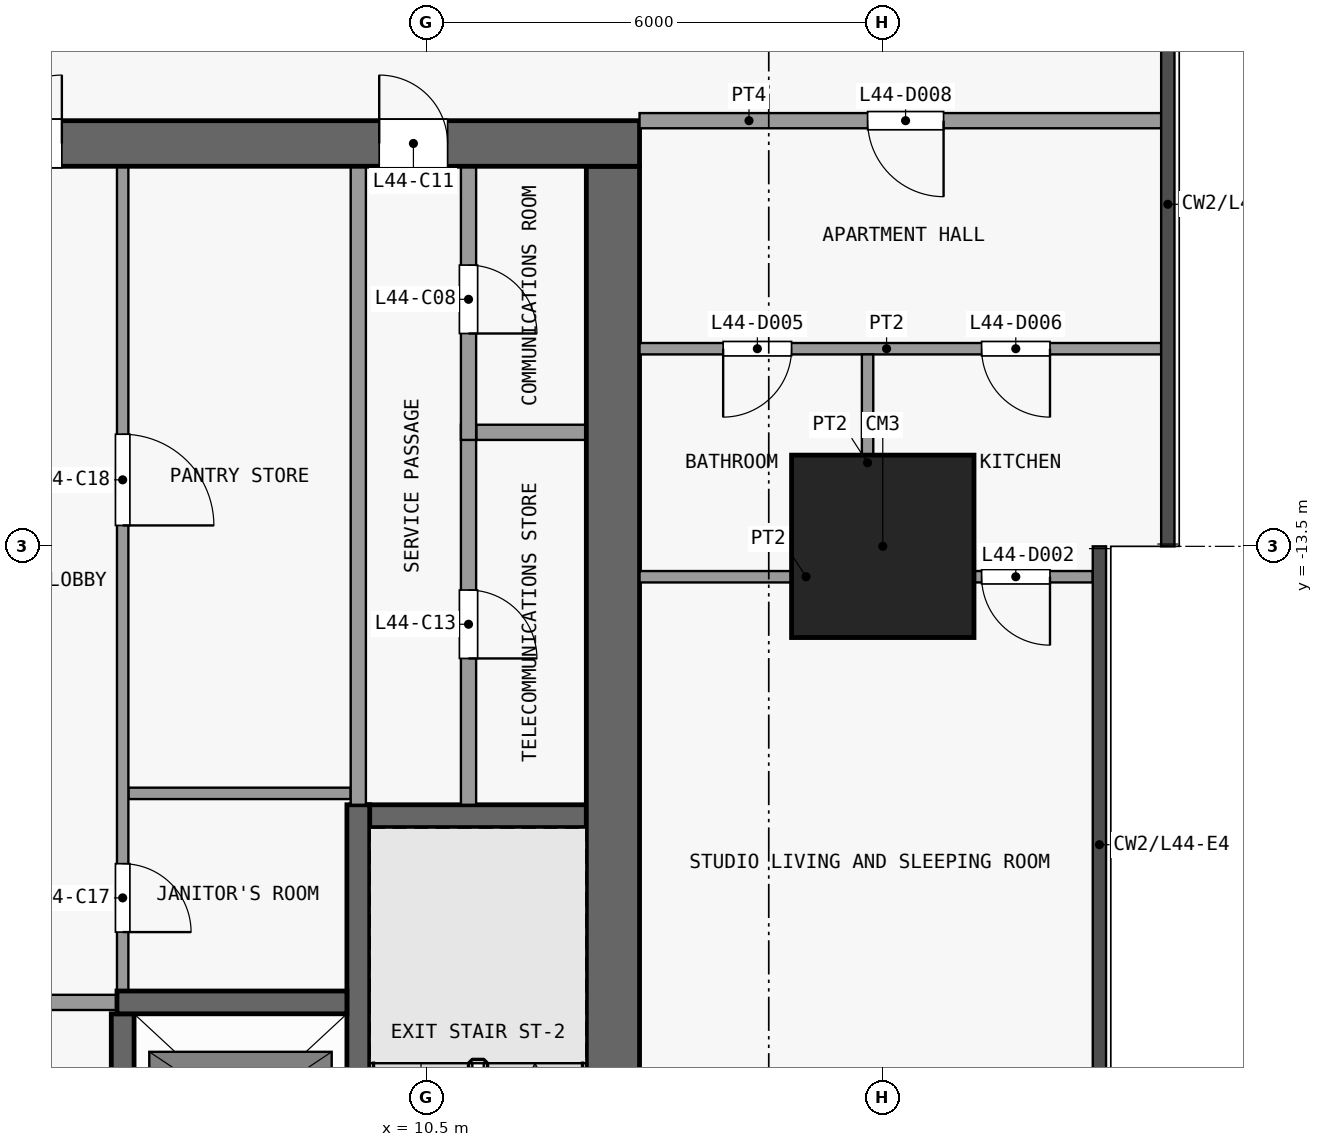
"""IFC4 building model, lengths in metres.
Left out: names, types, materials, properties, quantities, classifications, styles, units other than length and angle.
Written with IfcOpenShell. Run it as: python <this file> out.ifc"""

import sys

from ifc_helpers import new_model, si_unit, direction, frame, frame_2d, origin, origin_2d, place, context, subcontext, project, spatial, rectangle, extrude, element, fill, save


model = new_model("IFC4")
c1 = context("Model", 3, precision=1e-05, world=origin(), true_north=direction((0.0, 1.0)))
c2 = subcontext(c1, "Body", "Model", "MODEL_VIEW")
j1 = project(units=[si_unit("LENGTHUNIT", "METRE"), si_unit("PLANEANGLEUNIT", "RADIAN")], contexts=[c1])
p1 = place(None, origin())
s1 = spatial("IfcSite", under=j1, at=p1, CompositionType="ELEMENT")
p2 = place(p1, origin())
s2 = spatial("IfcBuilding", under=s1, at=p2, CompositionType="ELEMENT")
p3 = place(p2, frame((0.0, 0.0, 178.1)))
s3 = spatial("IfcBuildingStorey", under=s2, at=p3, CompositionType="ELEMENT", Elevation=178.1)
p4 = place(p3, frame((16.5, -13.5, 0.0), z_axis=(0.0, 0.0, 1.0), x_axis=(1.0, 0.0, 0.0)))
e1 = element("IfcColumn", 1, at=p4, inside=s3, PredefinedType="COLUMN", context=c2, shape_type="SweptSolid", body=[
    extrude(rectangle(XDim=2.4, YDim=2.4, at=origin_2d()), origin(), (0.0, 0.0, 1.0), 3.6),
])
p5 = place(p3, frame((-13.3, -8.2, 0.0), z_axis=(0.0, 0.0, 1.0), x_axis=(1.0, 0.0, 0.0)))
e2 = element("IfcWall", 2, at=p5, inside=s3, PredefinedType="SHEAR", context=c2, shape_type="SweptSolid", body=[
    extrude(rectangle(XDim=26.6, YDim=0.6, at=frame_2d((13.3, 0.0))), origin(), (0.0, 0.0, 1.0), 3.3),
])
p6 = place(p5, frame((7.6, 0.0, 0.0)))
e3 = element("IfcOpeningElement", 3, at=p6, cuts=e2, PredefinedType="OPENING", context=c2, shape_type="SweptSolid", body=[
    extrude(rectangle(XDim=1.8, YDim=2.1, at=frame_2d((0.9, 1.05))), frame((0.0, 0.31, 0.0), z_axis=(0.0, -1.0, 0.0), x_axis=(1.0, 0.0, 0.0)), (0.0, 0.0, 1.0), 0.62),
])
p7 = place(p5, frame((17.2, 0.0, 0.0)))
e4 = element("IfcOpeningElement", 4, at=p7, cuts=e2, PredefinedType="OPENING", context=c2, shape_type="SweptSolid", body=[
    extrude(rectangle(XDim=1.8, YDim=2.1, at=frame_2d((0.9, 1.05))), frame((0.0, 0.31, 0.0), z_axis=(0.0, -1.0, 0.0), x_axis=(1.0, 0.0, 0.0)), (0.0, 0.0, 1.0), 0.62),
])
p8 = place(p5, frame((2.525, 0.0, 0.0)))
e5 = element("IfcOpeningElement", 5, at=p8, cuts=e2, PredefinedType="OPENING", context=c2, shape_type="SweptSolid", body=[
    extrude(rectangle(XDim=0.9, YDim=2.1, at=frame_2d((0.45, 1.05))), frame((0.0, 0.31, 0.0), z_axis=(0.0, -1.0, 0.0), x_axis=(1.0, 0.0, 0.0)), (0.0, 0.0, 1.0), 0.62),
])
p9 = place(p5, frame((23.175, 0.0, 0.0)))
e6 = element("IfcOpeningElement", 6, at=p9, cuts=e2, PredefinedType="OPENING", context=c2, shape_type="SweptSolid", body=[
    extrude(rectangle(XDim=0.9, YDim=2.1, at=frame_2d((0.45, 1.05))), frame((0.0, 0.31, 0.0), z_axis=(0.0, -1.0, 0.0), x_axis=(1.0, 0.0, 0.0)), (0.0, 0.0, 1.0), 0.62),
])
p10 = place(p3, frame((12.95, -24.6, 0.0), z_axis=(0.0, 0.0, 1.0), x_axis=(0.0, 1.0, 0.0)))
e7 = element("IfcWall", 7, at=p10, inside=s3, PredefinedType="SHEAR", context=c2, shape_type="SweptSolid", body=[
    extrude(rectangle(XDim=16.1, YDim=0.7, at=frame_2d((8.05, 0.0))), origin(), (0.0, 0.0, 1.0), 3.3),
])
p11 = place(p3, frame((6.575, -19.5, 0.0), z_axis=(0.0, 0.0, 1.0), x_axis=(-1.0, 0.0, 0.0)))
e8 = element("IfcWall", 8, at=p11, inside=s3, PredefinedType="PARTITIONING", context=c2, shape_type="SweptSolid", body=[
    extrude(rectangle(XDim=3.325, YDim=0.2, at=frame_2d((1.663, 0.0))), origin(), (0.0, 0.0, 1.0), 3.3),
])
p12 = place(p11, frame((1.025, 0.0, 0.0)))
e9 = element("IfcOpeningElement", 9, at=p12, cuts=e8, PredefinedType="OPENING", context=c2, shape_type="SweptSolid", body=[
    extrude(rectangle(XDim=1.5, YDim=2.1, at=frame_2d((0.75, 1.05))), frame((0.0, 0.11, 0.0), z_axis=(0.0, -1.0, 0.0), x_axis=(1.0, 0.0, 0.0)), (0.0, 0.0, 1.0), 0.22),
])
p13 = place(p3, frame((6.425, -19.5, 0.0), z_axis=(0.0, 0.0, 1.0), x_axis=(1.0, 0.0, 0.0)))
e10 = element("IfcWall", 10, at=p13, inside=s3, PredefinedType="SHEAR", context=c2, shape_type="SweptSolid", body=[
    extrude(rectangle(XDim=3.025, YDim=0.3, at=frame_2d((1.512, 0.0))), origin(), (0.0, 0.0, 1.0), 3.3),
])
p14 = place(p3, frame((9.5, -17.05, 0.0), z_axis=(0.0, 0.0, 1.0), x_axis=(1.0, 0.0, 0.0)))
e11 = element("IfcWall", 11, at=p14, inside=s3, PredefinedType="SHEAR", context=c2, shape_type="SweptSolid", body=[
    extrude(rectangle(XDim=3.1, YDim=0.3, at=frame_2d((1.55, 0.0))), origin(), (0.0, 0.0, 1.0), 3.3),
])
p15 = place(p3, frame((6.575, -16.75, 0.0), z_axis=(0.0, 0.0, 1.0), x_axis=(1.0, 0.0, 0.0)))
e12 = element("IfcWall", 12, at=p15, inside=s3, PredefinedType="PARTITIONING", context=c2, shape_type="SweptSolid", body=[
    extrude(rectangle(XDim=2.925, YDim=0.15, at=frame_2d((1.462, 0.0))), origin(), (0.0, 0.0, 1.0), 3.3),
])
p16 = place(p3, frame((11.15, -12.0, 0.0), z_axis=(0.0, 0.0, 1.0), x_axis=(1.0, 0.0, 0.0)))
e13 = element("IfcWall", 13, at=p16, inside=s3, PredefinedType="PARTITIONING", context=c2, shape_type="SweptSolid", body=[
    extrude(rectangle(XDim=1.45, YDim=0.2, at=frame_2d((0.725, 0.0))), origin(), (0.0, 0.0, 1.0), 3.3),
])
p17 = place(p3, frame((6.5, -22.25, 0.0), z_axis=(0.0, 0.0, 1.0), x_axis=(0.0, 1.0, 0.0)))
e14 = element("IfcWall", 14, at=p17, inside=s3, PredefinedType="SHEAR", context=c2, shape_type="SweptSolid", body=[
    extrude(rectangle(XDim=2.6, YDim=0.3, at=frame_2d((1.3, 0.0))), origin(), (0.0, 0.0, 1.0), 3.3),
])
p18 = place(p17, frame((0.75, 0.0, 0.0)))
e15 = element("IfcOpeningElement", 15, at=p18, cuts=e14, PredefinedType="OPENING", context=c2, shape_type="SweptSolid", body=[
    extrude(rectangle(XDim=1.1, YDim=2.1, at=frame_2d((0.55, 1.05))), frame((0.0, 0.16, 0.0), z_axis=(0.0, -1.0, 0.0), x_axis=(1.0, 0.0, 0.0)), (0.0, 0.0, 1.0), 0.32),
])
p19 = place(p3, frame((6.5, -8.5, 0.0), z_axis=(0.0, 0.0, 1.0), x_axis=(0.0, -1.0, 0.0)))
e16 = element("IfcWall", 16, at=p19, inside=s3, PredefinedType="PARTITIONING", context=c2, shape_type="SweptSolid", body=[
    extrude(rectangle(XDim=10.85, YDim=0.15, at=frame_2d((5.425, 0.0))), origin(), (0.0, 0.0, 1.0), 3.3),
])
p20 = place(p19, frame((9.175, 0.0, 0.0)))
e17 = element("IfcOpeningElement", 17, at=p20, cuts=e16, PredefinedType="OPENING", context=c2, shape_type="SweptSolid", body=[
    extrude(rectangle(XDim=0.9, YDim=2.1, at=frame_2d((0.45, 1.05))), frame((0.0, 0.085, 0.0), z_axis=(0.0, -1.0, 0.0), x_axis=(1.0, 0.0, 0.0)), (0.0, 0.0, 1.0), 0.17),
])
p21 = place(p19, frame((3.525, 0.0, 0.0)))
e18 = element("IfcOpeningElement", 18, at=p21, cuts=e16, PredefinedType="OPENING", context=c2, shape_type="SweptSolid", body=[
    extrude(rectangle(XDim=1.2, YDim=2.1, at=frame_2d((0.6, 1.05))), frame((0.0, 0.085, 0.0), z_axis=(0.0, -1.0, 0.0), x_axis=(1.0, 0.0, 0.0)), (0.0, 0.0, 1.0), 0.17),
])
p22 = place(p3, frame((9.6, -16.9, 0.0), z_axis=(0.0, 0.0, 1.0), x_axis=(0.0, -1.0, 0.0)))
e19 = element("IfcWall", 19, at=p22, inside=s3, PredefinedType="SHEAR", context=c2, shape_type="SweptSolid", body=[
    extrude(rectangle(XDim=7.7, YDim=0.3, at=frame_2d((3.85, 0.0))), origin(), (0.0, 0.0, 1.0), 3.3),
])
p23 = place(p22, frame((6.5, 0.0, 0.0)))
e20 = element("IfcOpeningElement", 20, at=p23, cuts=e19, PredefinedType="OPENING", context=c2, shape_type="SweptSolid", body=[
    extrude(rectangle(XDim=1.1, YDim=2.1, at=frame_2d((0.55, 1.05))), frame((0.0, 0.16, 0.0), z_axis=(0.0, -1.0, 0.0), x_axis=(1.0, 0.0, 0.0)), (0.0, 0.0, 1.0), 0.32),
])
p24 = place(p3, frame((9.6, -16.9, 0.0), z_axis=(0.0, 0.0, 1.0), x_axis=(0.0, 1.0, 0.0)))
e21 = element("IfcWall", 21, at=p24, inside=s3, PredefinedType="PARTITIONING", context=c2, shape_type="SweptSolid", body=[
    extrude(rectangle(XDim=8.4, YDim=0.2, at=frame_2d((4.2, 0.0))), origin(), (0.0, 0.0, 1.0), 3.3),
])
p25 = place(p3, frame((11.05, -11.9, 0.0), z_axis=(0.0, 0.0, 1.0), x_axis=(0.0, -1.0, 0.0)))
e22 = element("IfcWall", 22, at=p25, inside=s3, PredefinedType="PARTITIONING", context=c2, shape_type="SweptSolid", body=[
    extrude(rectangle(XDim=5.0, YDim=0.2, at=frame_2d((2.5, 0.0))), origin(), (0.0, 0.0, 1.0), 3.3),
])
p26 = place(p25, frame((2.175, 0.0, 0.0)))
e23 = element("IfcOpeningElement", 23, at=p26, cuts=e22, PredefinedType="OPENING", context=c2, shape_type="SweptSolid", body=[
    extrude(rectangle(XDim=0.9, YDim=2.1, at=frame_2d((0.45, 1.05))), frame((0.0, 0.11, 0.0), z_axis=(0.0, -1.0, 0.0), x_axis=(1.0, 0.0, 0.0)), (0.0, 0.0, 1.0), 0.22),
])
p27 = place(p3, frame((11.05, -8.5, 0.0), z_axis=(0.0, 0.0, 1.0), x_axis=(0.0, -1.0, 0.0)))
e24 = element("IfcWall", 24, at=p27, inside=s3, PredefinedType="PARTITIONING", context=c2, shape_type="SweptSolid", body=[
    extrude(rectangle(XDim=3.6, YDim=0.2, at=frame_2d((1.8, 0.0))), origin(), (0.0, 0.0, 1.0), 3.3),
])
p28 = place(p27, frame((1.3, 0.0, 0.0)))
e25 = element("IfcOpeningElement", 25, at=p28, cuts=e24, PredefinedType="OPENING", context=c2, shape_type="SweptSolid", body=[
    extrude(rectangle(XDim=0.9, YDim=2.1, at=frame_2d((0.45, 1.05))), frame((0.0, 0.11, 0.0), z_axis=(0.0, -1.0, 0.0), x_axis=(1.0, 0.0, 0.0)), (0.0, 0.0, 1.0), 0.22),
])
p29 = place(p3, frame((13.3, -13.9, 0.0), z_axis=(0.0, 0.0, 1.0), x_axis=(1.0, 0.0, 0.0)))
e26 = element("IfcWall", 26, at=p29, inside=s3, PredefinedType="PARTITIONING", context=c2, shape_type="SweptSolid", body=[
    extrude(rectangle(XDim=5.962, YDim=0.15, at=frame_2d((2.981, 0.0))), origin(), (0.0, 0.0, 1.0), 3.3),
])
p30 = place(p29, frame((4.5, 0.0, 0.0)))
e27 = element("IfcOpeningElement", 27, at=p30, cuts=e26, PredefinedType="OPENING", context=c2, shape_type="SweptSolid", body=[
    extrude(rectangle(XDim=0.9, YDim=2.1, at=frame_2d((0.45, 1.05))), frame((0.0, 0.085, 0.0), z_axis=(0.0, -1.0, 0.0), x_axis=(1.0, 0.0, 0.0)), (0.0, 0.0, 1.0), 0.17),
])
p31 = place(p3, frame((13.3, -10.9, 0.0), z_axis=(0.0, 0.0, 1.0), x_axis=(1.0, 0.0, 0.0)))
e28 = element("IfcWall", 28, at=p31, inside=s3, PredefinedType="PARTITIONING", context=c2, shape_type="SweptSolid", body=[
    extrude(rectangle(XDim=6.863, YDim=0.15, at=frame_2d((3.431, 0.0))), origin(), (0.0, 0.0, 1.0), 3.3),
])
p32 = place(p31, frame((1.1, 0.0, 0.0)))
e29 = element("IfcOpeningElement", 29, at=p32, cuts=e28, PredefinedType="OPENING", context=c2, shape_type="SweptSolid", body=[
    extrude(rectangle(XDim=0.9, YDim=2.1, at=frame_2d((0.45, 1.05))), frame((0.0, 0.085, 0.0), z_axis=(0.0, -1.0, 0.0), x_axis=(1.0, 0.0, 0.0)), (0.0, 0.0, 1.0), 0.17),
])
p33 = place(p31, frame((4.5, 0.0, 0.0)))
e30 = element("IfcOpeningElement", 30, at=p33, cuts=e28, PredefinedType="OPENING", context=c2, shape_type="SweptSolid", body=[
    extrude(rectangle(XDim=0.9, YDim=2.1, at=frame_2d((0.45, 1.05))), frame((0.0, 0.085, 0.0), z_axis=(0.0, -1.0, 0.0), x_axis=(1.0, 0.0, 0.0)), (0.0, 0.0, 1.0), 0.17),
])
p34 = place(p3, frame((13.3, -7.9, 0.0), z_axis=(0.0, 0.0, 1.0), x_axis=(1.0, 0.0, 0.0)))
e31 = element("IfcWall", 31, at=p34, inside=s3, PredefinedType="PARTITIONING", context=c2, shape_type="SweptSolid", body=[
    extrude(rectangle(XDim=6.863, YDim=0.2, at=frame_2d((3.431, 0.0))), origin(), (0.0, 0.0, 1.0), 3.3),
])
p35 = place(p34, frame((3.0, 0.0, 0.0)))
e32 = element("IfcOpeningElement", 32, at=p35, cuts=e31, PredefinedType="OPENING", context=c2, shape_type="SweptSolid", body=[
    extrude(rectangle(XDim=1.0, YDim=2.1, at=frame_2d((0.5, 1.05))), frame((0.0, 0.11, 0.0), z_axis=(0.0, -1.0, 0.0), x_axis=(1.0, 0.0, 0.0)), (0.0, 0.0, 1.0), 0.22),
])
p36 = place(p3, frame((16.3, -13.825, 0.0), z_axis=(0.0, 0.0, 1.0), x_axis=(0.0, 1.0, 0.0)))
e33 = element("IfcWall", 33, at=p36, inside=s3, PredefinedType="PARTITIONING", context=c2, shape_type="SweptSolid", body=[
    extrude(rectangle(XDim=2.85, YDim=0.15, at=frame_2d((1.425, 0.0))), origin(), (0.0, 0.0, 1.0), 3.3),
])
p37 = place(p7, origin())
e34 = element("IfcDoor", 34, at=p37, inside=s3, OperationType="DOUBLE_DOOR_SINGLE_SWING", PredefinedType="DOOR", context=c2, shape_type="SweptSolid", body=[
    extrude(rectangle(XDim=1.8, YDim=2.1, at=frame_2d((0.9, 1.05))), frame((0.0, 0.025, 0.0), z_axis=(0.0, -1.0, 0.0), x_axis=(1.0, 0.0, 0.0)), (0.0, 0.0, 1.0), 0.05),
])
fill(e4, e34)
p38 = place(p28, origin())
e35 = element("IfcDoor", 35, at=p38, inside=s3, OperationType="SINGLE_SWING_RIGHT", PredefinedType="DOOR", context=c2, shape_type="SweptSolid", body=[
    extrude(rectangle(XDim=0.9, YDim=2.1, at=frame_2d((0.45, 1.05))), frame((0.0, 0.025, 0.0), z_axis=(0.0, -1.0, 0.0), x_axis=(1.0, 0.0, 0.0)), (0.0, 0.0, 1.0), 0.05),
])
fill(e25, e35)
p39 = place(p9, origin())
e36 = element("IfcDoor", 36, at=p39, inside=s3, OperationType="SINGLE_SWING_LEFT", PredefinedType="DOOR", context=c2, shape_type="SweptSolid", body=[
    extrude(rectangle(XDim=0.9, YDim=2.1, at=frame_2d((0.45, 1.05))), frame((0.0, 0.025, 0.0), z_axis=(0.0, -1.0, 0.0), x_axis=(1.0, 0.0, 0.0)), (0.0, 0.0, 1.0), 0.05),
])
fill(e6, e36)
p40 = place(p26, origin())
e37 = element("IfcDoor", 37, at=p40, inside=s3, OperationType="SINGLE_SWING_RIGHT", PredefinedType="DOOR", context=c2, shape_type="SweptSolid", body=[
    extrude(rectangle(XDim=0.9, YDim=2.1, at=frame_2d((0.45, 1.05))), frame((0.0, 0.025, 0.0), z_axis=(0.0, -1.0, 0.0), x_axis=(1.0, 0.0, 0.0)), (0.0, 0.0, 1.0), 0.05),
])
fill(e23, e37)
p41 = place(p20, origin())
e38 = element("IfcDoor", 38, at=p41, inside=s3, OperationType="SINGLE_SWING_RIGHT", PredefinedType="DOOR", context=c2, shape_type="SweptSolid", body=[
    extrude(rectangle(XDim=0.9, YDim=2.1, at=frame_2d((0.45, 1.05))), frame((0.0, 0.025, 0.0), z_axis=(0.0, -1.0, 0.0), x_axis=(1.0, 0.0, 0.0)), (0.0, 0.0, 1.0), 0.05),
])
fill(e17, e38)
p42 = place(p21, origin())
e39 = element("IfcDoor", 39, at=p42, inside=s3, OperationType="SINGLE_SWING_RIGHT", PredefinedType="DOOR", context=c2, shape_type="SweptSolid", body=[
    extrude(rectangle(XDim=1.2, YDim=2.1, at=frame_2d((0.6, 1.05))), frame((0.0, 0.025, 0.0), z_axis=(0.0, -1.0, 0.0), x_axis=(1.0, 0.0, 0.0)), (0.0, 0.0, 1.0), 0.05),
])
fill(e18, e39)
p43 = place(p30, origin())
e40 = element("IfcDoor", 40, at=p43, inside=s3, OperationType="SINGLE_SWING_RIGHT", PredefinedType="DOOR", context=c2, shape_type="SweptSolid", body=[
    extrude(rectangle(XDim=0.9, YDim=2.1, at=frame_2d((0.45, 1.05))), frame((0.0, 0.025, 0.0), z_axis=(0.0, -1.0, 0.0), x_axis=(1.0, 0.0, 0.0)), (0.0, 0.0, 1.0), 0.05),
])
fill(e27, e40)
p44 = place(p32, origin())
e41 = element("IfcDoor", 41, at=p44, inside=s3, OperationType="SINGLE_SWING_LEFT", PredefinedType="DOOR", context=c2, shape_type="SweptSolid", body=[
    extrude(rectangle(XDim=0.9, YDim=2.1, at=frame_2d((0.45, 1.05))), frame((0.0, 0.025, 0.0), z_axis=(0.0, -1.0, 0.0), x_axis=(1.0, 0.0, 0.0)), (0.0, 0.0, 1.0), 0.05),
])
fill(e29, e41)
p45 = place(p33, origin())
e42 = element("IfcDoor", 42, at=p45, inside=s3, OperationType="SINGLE_SWING_RIGHT", PredefinedType="DOOR", context=c2, shape_type="SweptSolid", body=[
    extrude(rectangle(XDim=0.9, YDim=2.1, at=frame_2d((0.45, 1.05))), frame((0.0, 0.025, 0.0), z_axis=(0.0, -1.0, 0.0), x_axis=(1.0, 0.0, 0.0)), (0.0, 0.0, 1.0), 0.05),
])
fill(e30, e42)
p46 = place(p35, origin())
e43 = element("IfcDoor", 43, at=p46, inside=s3, OperationType="SINGLE_SWING_RIGHT", PredefinedType="DOOR", context=c2, shape_type="SweptSolid", body=[
    extrude(rectangle(XDim=1.0, YDim=2.1, at=frame_2d((0.5, 1.05))), frame((0.0, 0.025, 0.0), z_axis=(0.0, -1.0, 0.0), x_axis=(1.0, 0.0, 0.0)), (0.0, 0.0, 1.0), 0.05),
])
fill(e32, e43)
save(model, sys.argv[1])
